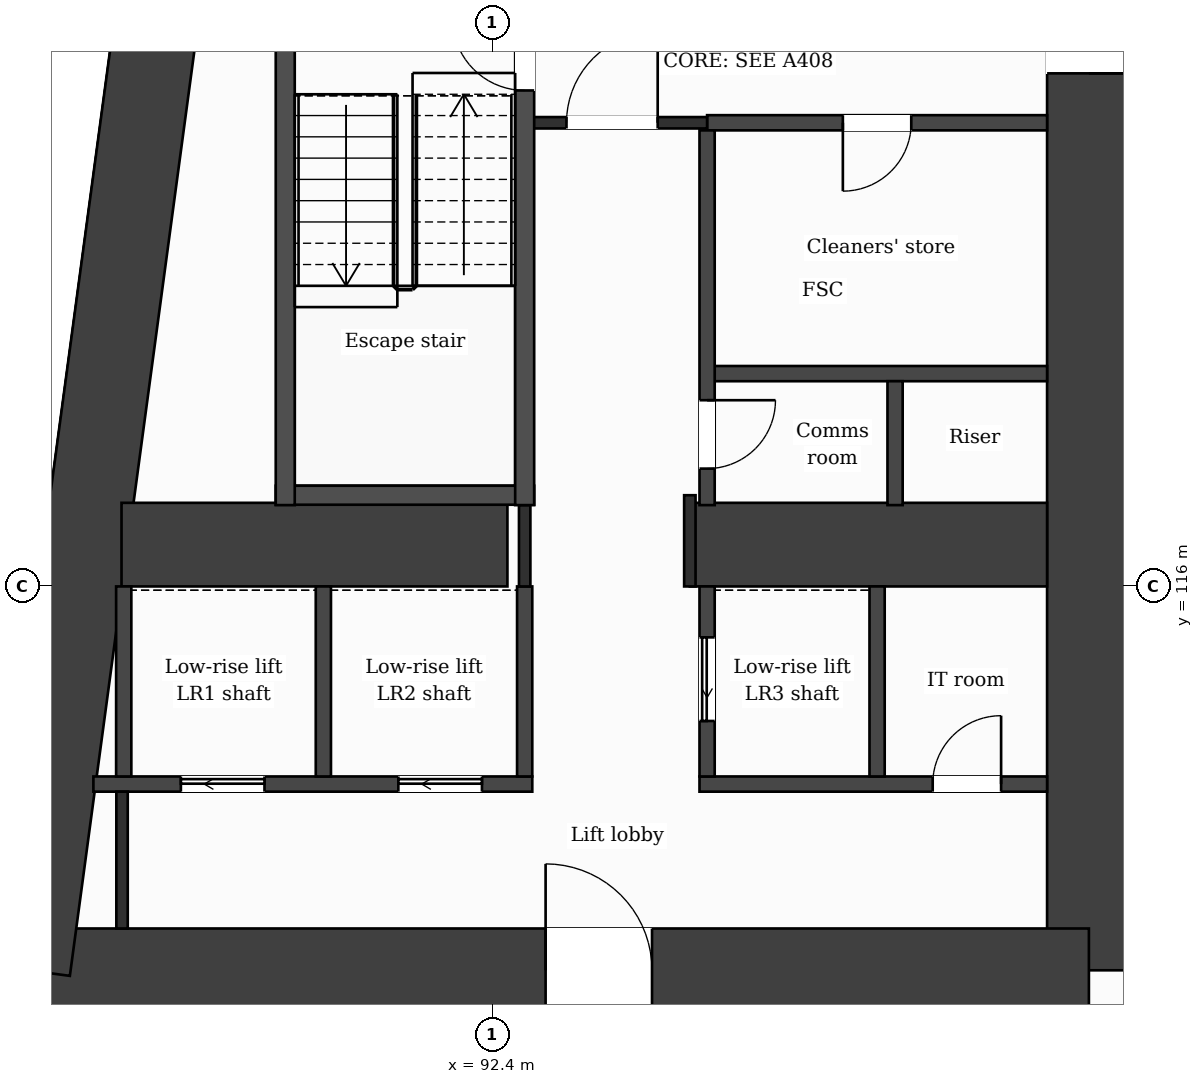
"""IFC4 building model, lengths in metres.
Left out: names, types, materials, properties, quantities, classifications, styles, units other than length and angle.
Written with IfcOpenShell. Run it as: python <this file> out.ifc"""

import sys

from ifc_helpers import new_model, si_unit, direction, frame, frame_2d, origin, place, context, subcontext, project, spatial, rectangle, extrude, element, fill, save


model = new_model("IFC4")
c1 = context("Model", 3, precision=1e-05, world=origin(), true_north=direction((0.0, 1.0)))
c2 = subcontext(c1, "Body", "Model", "MODEL_VIEW")
j1 = project(units=[si_unit("LENGTHUNIT", "METRE"), si_unit("PLANEANGLEUNIT", "RADIAN")], contexts=[c1])
p1 = place(None, origin())
s1 = spatial("IfcSite", under=j1, at=p1, CompositionType="ELEMENT")
p2 = place(p1, origin())
s2 = spatial("IfcBuilding", under=s1, at=p2, CompositionType="ELEMENT")
p3 = place(p2, frame((0.0, 0.0, 42.5)))
s3 = spatial("IfcBuildingStorey", under=s2, at=p3, CompositionType="ELEMENT", Elevation=42.5)
p4 = place(p3, frame((100.25, 131.85, 0.0), z_axis=(0.0, 0.0, 1.0), x_axis=(0.0, -1.0, 0.0)))
e1 = element("IfcWall", 1, at=p4, inside=s3, PredefinedType="SHEAR", context=c2, shape_type="SweptSolid", body=[
    extrude(rectangle(XDim=20.9, YDim=1.1, at=frame_2d((10.45, 0.0))), origin(), (0.0, 0.0, 1.0), 3.5),
])
p5 = place(p4, frame((7.7, 0.0, 0.0)))
e2 = element("IfcOpeningElement", 2, at=p5, cuts=e1, PredefinedType="OPENING", context=c2, shape_type="SweptSolid", body=[
    extrude(rectangle(XDim=1.4, YDim=2.1, at=frame_2d((0.7, 1.05))), frame((0.0, 0.56, 0.0), z_axis=(0.0, -1.0, 0.0), x_axis=(1.0, 0.0, 0.0)), (0.0, 0.0, 1.0), 1.12),
])
p6 = place(p3, frame((100.25, 110.95, 0.0), z_axis=(0.0, 0.0, 1.0), x_axis=(-1.0, 0.0, 0.0)))
e3 = element("IfcWall", 3, at=p6, inside=s3, PredefinedType="SHEAR", context=c2, shape_type="SweptSolid", body=[
    extrude(rectangle(XDim=13.952, YDim=1.1, at=frame_2d((6.976, 0.0))), origin(), (0.0, 0.0, 1.0), 3.5),
])
p7 = place(p6, frame((5.748, 0.0, 0.0)))
e4 = element("IfcOpeningElement", 4, at=p7, cuts=e3, PredefinedType="OPENING", context=c2, shape_type="SweptSolid", body=[
    extrude(rectangle(XDim=1.4, YDim=2.1, at=frame_2d((0.7, 1.05))), frame((0.0, 0.56, 0.0), z_axis=(0.0, -1.0, 0.0), x_axis=(1.0, 0.0, 0.0)), (0.0, 0.0, 1.0), 1.12),
])
p8 = place(p3, frame((86.298, 110.95, 0.0), z_axis=(0.0, 0.0, 1.0), x_axis=(0.133400422634, 0.99106222168, 0.0)))
e5 = element("IfcWall", 5, at=p8, inside=s3, PredefinedType="SHEAR", context=c2, shape_type="SweptSolid", body=[
    extrude(rectangle(XDim=21.089, YDim=1.1, at=frame_2d((10.544, 0.0))), origin(), (0.0, 0.0, 1.0), 3.5),
])
p9 = place(p3, frame((87.523, 116.55, 0.0), z_axis=(0.0, 0.0, 1.0), x_axis=(1.0, 0.0, 0.0)))
e6 = element("IfcWall", 6, at=p9, inside=s3, PredefinedType="SHEAR", context=c2, shape_type="SweptSolid", body=[
    extrude(rectangle(XDim=5.077, YDim=1.1, at=frame_2d((2.539, 0.0))), origin(), (0.0, 0.0, 1.0), 3.5),
])
p10 = place(p3, frame((95.0, 116.55, 0.0), z_axis=(0.0, 0.0, 1.0), x_axis=(1.0, 0.0, 0.0)))
e7 = element("IfcWall", 7, at=p10, inside=s3, PredefinedType="SHEAR", context=c2, shape_type="SweptSolid", body=[
    extrude(rectangle(XDim=4.7, YDim=1.1, at=frame_2d((2.35, 0.0))), origin(), (0.0, 0.0, 1.0), 3.5),
])
p11 = place(p3, frame((87.153, 113.4, 0.0), z_axis=(0.0, 0.0, 1.0), x_axis=(1.0, 0.0, 0.0)))
e8 = element("IfcWall", 8, at=p11, inside=s3, PredefinedType="PARTITIONING", context=c2, shape_type="SweptSolid", body=[
    extrude(rectangle(XDim=5.774, YDim=0.2, at=frame_2d((2.887, 0.0))), origin(), (0.0, 0.0, 1.0), 3.18),
])
p12 = place(p11, frame((1.151, 0.0, 0.0)))
e9 = element("IfcOpeningElement", 9, at=p12, cuts=e8, PredefinedType="OPENING", context=c2, shape_type="SweptSolid", body=[
    extrude(rectangle(XDim=1.1, YDim=2.1, at=frame_2d((0.55, 1.05))), frame((0.0, 0.11, 0.0), z_axis=(0.0, -1.0, 0.0), x_axis=(1.0, 0.0, 0.0)), (0.0, 0.0, 1.0), 0.22),
])
p13 = place(p11, frame((4.012, 0.0, 0.0)))
e10 = element("IfcOpeningElement", 10, at=p13, cuts=e8, PredefinedType="OPENING", context=c2, shape_type="SweptSolid", body=[
    extrude(rectangle(XDim=1.1, YDim=2.1, at=frame_2d((0.55, 1.05))), frame((0.0, 0.11, 0.0), z_axis=(0.0, -1.0, 0.0), x_axis=(1.0, 0.0, 0.0)), (0.0, 0.0, 1.0), 0.22),
])
p14 = place(p3, frame((95.127, 113.4, 0.0), z_axis=(0.0, 0.0, 1.0), x_axis=(1.0, 0.0, 0.0)))
e11 = element("IfcWall", 11, at=p14, inside=s3, PredefinedType="PARTITIONING", context=c2, shape_type="SweptSolid", body=[
    extrude(rectangle(XDim=4.573, YDim=0.2, at=frame_2d((2.287, 0.0))), origin(), (0.0, 0.0, 1.0), 3.18),
])
p15 = place(p14, frame((3.068, 0.0, 0.0)))
e12 = element("IfcOpeningElement", 12, at=p15, cuts=e11, PredefinedType="OPENING", context=c2, shape_type="SweptSolid", body=[
    extrude(rectangle(XDim=0.9, YDim=2.1, at=frame_2d((0.45, 1.05))), frame((0.0, 0.11, 0.0), z_axis=(0.0, -1.0, 0.0), x_axis=(1.0, 0.0, 0.0)), (0.0, 0.0, 1.0), 0.22),
])
p16 = place(p3, frame((89.552, 117.2, 0.0), z_axis=(0.0, 0.0, 1.0), x_axis=(1.0, 0.0, 0.0)))
e13 = element("IfcWall", 13, at=p16, inside=s3, PredefinedType="PARTITIONING", context=c2, shape_type="SweptSolid", body=[
    extrude(rectangle(XDim=3.4, YDim=0.25, at=frame_2d((1.7, 0.0))), origin(), (0.0, 0.0, 1.0), 3.18),
])
p17 = place(p3, frame((95.227, 118.8, 0.0), z_axis=(0.0, 0.0, 1.0), x_axis=(1.0, 0.0, 0.0)))
e14 = element("IfcWall", 14, at=p17, inside=s3, PredefinedType="PARTITIONING", context=c2, shape_type="SweptSolid", body=[
    extrude(rectangle(XDim=4.473, YDim=0.2, at=frame_2d((2.236, 0.0))), origin(), (0.0, 0.0, 1.0), 3.18),
])
p18 = place(p3, frame((95.227, 122.1, 0.0), z_axis=(0.0, 0.0, 1.0), x_axis=(1.0, 0.0, 0.0)))
e15 = element("IfcWall", 15, at=p18, inside=s3, PredefinedType="PARTITIONING", context=c2, shape_type="SweptSolid", body=[
    extrude(rectangle(XDim=4.473, YDim=0.2, at=frame_2d((2.236, 0.0))), origin(), (0.0, 0.0, 1.0), 3.18),
])
p19 = place(p18, frame((1.786, 0.0, 0.0)))
e16 = element("IfcOpeningElement", 16, at=p19, cuts=e15, PredefinedType="OPENING", context=c2, shape_type="SweptSolid", body=[
    extrude(rectangle(XDim=0.9, YDim=2.1, at=frame_2d((0.45, 1.05))), frame((0.0, 0.11, 0.0), z_axis=(0.0, -1.0, 0.0), x_axis=(1.0, 0.0, 0.0)), (0.0, 0.0, 1.0), 0.22),
])
p20 = place(p3, frame((92.827, 122.1, 0.0), z_axis=(0.0, 0.0, 1.0), x_axis=(1.0, 0.0, 0.0)))
e17 = element("IfcWall", 17, at=p20, inside=s3, PredefinedType="PARTITIONING", context=c2, shape_type="SweptSolid", body=[
    extrude(rectangle(XDim=2.4, YDim=0.15, at=frame_2d((1.2, 0.0))), origin(), (0.0, 0.0, 1.0), 3.18),
])
p21 = place(p20, frame((0.55, 0.0, 0.0)))
e18 = element("IfcOpeningElement", 18, at=p21, cuts=e17, PredefinedType="OPENING", context=c2, shape_type="SweptSolid", body=[
    extrude(rectangle(XDim=1.2, YDim=2.1, at=frame_2d((0.6, 1.05))), frame((0.0, 0.085, 0.0), z_axis=(0.0, -1.0, 0.0), x_axis=(1.0, 0.0, 0.0)), (0.0, 0.0, 1.0), 0.17),
])
p22 = place(p3, frame((87.552, 113.5, 0.0), z_axis=(0.0, 0.0, 1.0), x_axis=(0.0, 1.0, 0.0)))
e19 = element("IfcWall", 19, at=p22, inside=s3, PredefinedType="PARTITIONING", context=c2, shape_type="SweptSolid", body=[
    extrude(rectangle(XDim=2.5, YDim=0.2, at=frame_2d((1.25, 0.0))), origin(), (0.0, 0.0, 1.0), 3.18),
])
p23 = place(p3, frame((87.53, 111.5, 0.0), z_axis=(0.0, 0.0, 1.0), x_axis=(0.0, 1.0, 0.0)))
e20 = element("IfcWall", 20, at=p23, inside=s3, PredefinedType="PARTITIONING", context=c2, shape_type="SweptSolid", body=[
    extrude(rectangle(XDim=1.8, YDim=0.15, at=frame_2d((0.9, 0.0))), origin(), (0.0, 0.0, 1.0), 3.18),
])
p24 = place(p3, frame((89.677, 117.07, 0.0), z_axis=(0.0, 0.0, 1.0), x_axis=(0.0, 1.0, 0.0)))
e21 = element("IfcWall", 21, at=p24, inside=s3, PredefinedType="PARTITIONING", context=c2, shape_type="SweptSolid", body=[
    extrude(rectangle(XDim=6.755, YDim=0.25, at=frame_2d((3.377, 0.0))), origin(), (0.0, 0.0, 1.0), 3.18),
])
for number, where, z_axis, x_axis in (
    (22, (90.178, 113.5, 0.0), (0.0, 0.0, 1.0), (0.0, 1.0, 0.0)),
    (23, (92.827, 113.5, 0.0), (0.0, 0.0, 1.0), (0.0, 1.0, 0.0)),
):
    element("IfcWall", number, at=place(p3, frame(where, z_axis=z_axis, x_axis=x_axis)), inside=s3, PredefinedType="PARTITIONING", context=c2, shape_type="SweptSolid", body=[
        extrude(rectangle(XDim=2.5, YDim=0.2, at=frame_2d((1.25, 0.0))), origin(), (0.0, 0.0, 1.0), 3.18),
    ])
p25 = place(p3, frame((92.827, 116.0, 0.0), z_axis=(0.0, 0.0, 1.0), x_axis=(0.0, 1.0, 0.0)))
e24 = element("IfcWall", 24, at=p25, inside=s3, PredefinedType="PARTITIONING", context=c2, shape_type="SweptSolid", body=[
    extrude(rectangle(XDim=1.07, YDim=0.15, at=frame_2d((0.535, 0.0))), origin(), (0.0, 0.0, 1.0), 3.18),
])
p26 = place(p3, frame((92.827, 117.07, 0.0), z_axis=(0.0, 0.0, 1.0), x_axis=(0.0, 1.0, 0.0)))
e25 = element("IfcWall", 25, at=p26, inside=s3, PredefinedType="PARTITIONING", context=c2, shape_type="SweptSolid", body=[
    extrude(rectangle(XDim=6.755, YDim=0.25, at=frame_2d((3.377, 0.0))), origin(), (0.0, 0.0, 1.0), 3.18),
])
p27 = place(p26, frame((5.455, 0.0, 0.0)))
e26 = element("IfcOpeningElement", 26, at=p27, cuts=e25, PredefinedType="OPENING", context=c2, shape_type="SweptSolid", body=[
    extrude(rectangle(XDim=0.95, YDim=2.1, at=frame_2d((0.475, 1.05))), frame((0.0, 0.135, 0.0), z_axis=(0.0, -1.0, 0.0), x_axis=(1.0, 0.0, 0.0)), (0.0, 0.0, 1.0), 0.27),
])
p28 = place(p3, frame((95.0, 116.0, 0.0), z_axis=(0.0, 0.0, 1.0), x_axis=(0.0, 1.0, 0.0)))
e27 = element("IfcWall", 27, at=p28, inside=s3, PredefinedType="PARTITIONING", context=c2, shape_type="SweptSolid", body=[
    extrude(rectangle(XDim=1.2, YDim=0.15, at=frame_2d((0.6, 0.0))), origin(), (0.0, 0.0, 1.0), 3.18),
])
p29 = place(p3, frame((95.227, 113.5, 0.0), z_axis=(0.0, 0.0, 1.0), x_axis=(0.0, 1.0, 0.0)))
e28 = element("IfcWall", 28, at=p29, inside=s3, PredefinedType="PARTITIONING", context=c2, shape_type="SweptSolid", body=[
    extrude(rectangle(XDim=2.5, YDim=0.2, at=frame_2d((1.25, 0.0))), origin(), (0.0, 0.0, 1.0), 3.18),
])
p30 = place(p29, frame((0.73, 0.0, 0.0)))
e29 = element("IfcOpeningElement", 29, at=p30, cuts=e28, PredefinedType="OPENING", context=c2, shape_type="SweptSolid", body=[
    extrude(rectangle(XDim=1.1, YDim=2.1, at=frame_2d((0.55, 1.05))), frame((0.0, 0.11, 0.0), z_axis=(0.0, -1.0, 0.0), x_axis=(1.0, 0.0, 0.0)), (0.0, 0.0, 1.0), 0.22),
])
p31 = place(p3, frame((95.227, 117.07, 0.0), z_axis=(0.0, 0.0, 1.0), x_axis=(0.0, 1.0, 0.0)))
e30 = element("IfcWall", 30, at=p31, inside=s3, PredefinedType="PARTITIONING", context=c2, shape_type="SweptSolid", body=[
    extrude(rectangle(XDim=4.93, YDim=0.2, at=frame_2d((2.465, 0.0))), origin(), (0.0, 0.0, 1.0), 3.18),
])
p32 = place(p31, frame((0.48, 0.0, 0.0)))
e31 = element("IfcOpeningElement", 31, at=p32, cuts=e30, PredefinedType="OPENING", context=c2, shape_type="SweptSolid", body=[
    extrude(rectangle(XDim=0.9, YDim=2.1, at=frame_2d((0.45, 1.05))), frame((0.0, 0.11, 0.0), z_axis=(0.0, -1.0, 0.0), x_axis=(1.0, 0.0, 0.0)), (0.0, 0.0, 1.0), 0.22),
])
p33 = place(p3, frame((97.463, 113.5, 0.0), z_axis=(0.0, 0.0, 1.0), x_axis=(0.0, 1.0, 0.0)))
e32 = element("IfcWall", 32, at=p33, inside=s3, PredefinedType="PARTITIONING", context=c2, shape_type="SweptSolid", body=[
    extrude(rectangle(XDim=2.5, YDim=0.2, at=frame_2d((1.25, 0.0))), origin(), (0.0, 0.0, 1.0), 3.18),
])
p34 = place(p3, frame((97.7, 117.07, 0.0), z_axis=(0.0, 0.0, 1.0), x_axis=(0.0, 1.0, 0.0)))
e33 = element("IfcWall", 33, at=p34, inside=s3, PredefinedType="PARTITIONING", context=c2, shape_type="SweptSolid", body=[
    extrude(rectangle(XDim=1.63, YDim=0.2, at=frame_2d((0.815, 0.0))), origin(), (0.0, 0.0, 1.0), 3.18),
])
p35 = place(p21, origin())
e34 = element("IfcDoor", 34, at=p35, inside=s3, OperationType="SINGLE_SWING_RIGHT", PredefinedType="DOOR", context=c2, shape_type="SweptSolid", body=[
    extrude(rectangle(XDim=1.2, YDim=2.1, at=frame_2d((0.6, 1.05))), frame((0.0, 0.025, 0.0), z_axis=(0.0, -1.0, 0.0), x_axis=(1.0, 0.0, 0.0)), (0.0, 0.0, 1.0), 0.05),
])
fill(e18, e34)
p36 = place(p19, origin())
e35 = element("IfcDoor", 35, at=p36, inside=s3, OperationType="SINGLE_SWING_LEFT", PredefinedType="DOOR", context=c2, shape_type="SweptSolid", body=[
    extrude(rectangle(XDim=0.9, YDim=2.1, at=frame_2d((0.45, 1.05))), frame((0.0, 0.025, 0.0), z_axis=(0.0, -1.0, 0.0), x_axis=(1.0, 0.0, 0.0)), (0.0, 0.0, 1.0), 0.05),
])
fill(e16, e35)
p37 = place(p27, origin())
e36 = element("IfcDoor", 36, at=p37, inside=s3, OperationType="SINGLE_SWING_RIGHT", PredefinedType="DOOR", context=c2, shape_type="SweptSolid", body=[
    extrude(rectangle(XDim=0.95, YDim=2.1, at=frame_2d((0.475, 1.05))), frame((0.0, 0.025, 0.0), z_axis=(0.0, -1.0, 0.0), x_axis=(1.0, 0.0, 0.0)), (0.0, 0.0, 1.0), 0.05),
])
fill(e26, e36)
p38 = place(p32, origin())
e37 = element("IfcDoor", 37, at=p38, inside=s3, OperationType="SINGLE_SWING_RIGHT", PredefinedType="DOOR", context=c2, shape_type="SweptSolid", body=[
    extrude(rectangle(XDim=0.9, YDim=2.1, at=frame_2d((0.45, 1.05))), frame((0.0, 0.025, 0.0), z_axis=(0.0, -1.0, 0.0), x_axis=(1.0, 0.0, 0.0)), (0.0, 0.0, 1.0), 0.05),
])
fill(e31, e37)
p39 = place(p12, origin())
e38 = element("IfcDoor", 38, at=p39, inside=s3, OperationType="SLIDING_TO_LEFT", PredefinedType="DOOR", context=c2, shape_type="SweptSolid", body=[
    extrude(rectangle(XDim=1.1, YDim=2.1, at=frame_2d((0.55, 1.05))), frame((0.0, 0.025, 0.0), z_axis=(0.0, -1.0, 0.0), x_axis=(1.0, 0.0, 0.0)), (0.0, 0.0, 1.0), 0.05),
])
fill(e9, e38)
p40 = place(p13, origin())
e39 = element("IfcDoor", 39, at=p40, inside=s3, OperationType="SLIDING_TO_LEFT", PredefinedType="DOOR", context=c2, shape_type="SweptSolid", body=[
    extrude(rectangle(XDim=1.1, YDim=2.1, at=frame_2d((0.55, 1.05))), frame((0.0, 0.025, 0.0), z_axis=(0.0, -1.0, 0.0), x_axis=(1.0, 0.0, 0.0)), (0.0, 0.0, 1.0), 0.05),
])
fill(e10, e39)
p41 = place(p30, origin())
e40 = element("IfcDoor", 40, at=p41, inside=s3, OperationType="SLIDING_TO_LEFT", PredefinedType="DOOR", context=c2, shape_type="SweptSolid", body=[
    extrude(rectangle(XDim=1.1, YDim=2.1, at=frame_2d((0.55, 1.05))), frame((0.0, 0.025, 0.0), z_axis=(0.0, -1.0, 0.0), x_axis=(1.0, 0.0, 0.0)), (0.0, 0.0, 1.0), 0.05),
])
fill(e29, e40)
p42 = place(p15, origin())
e41 = element("IfcDoor", 41, at=p42, inside=s3, OperationType="SINGLE_SWING_RIGHT", PredefinedType="DOOR", context=c2, shape_type="SweptSolid", body=[
    extrude(rectangle(XDim=0.9, YDim=2.1, at=frame_2d((0.45, 1.05))), frame((0.0, 0.025, 0.0), z_axis=(0.0, -1.0, 0.0), x_axis=(1.0, 0.0, 0.0)), (0.0, 0.0, 1.0), 0.05),
])
fill(e12, e41)
p43 = place(p7, origin())
e42 = element("IfcDoor", 42, at=p43, inside=s3, OperationType="SINGLE_SWING_RIGHT", PredefinedType="DOOR", context=c2, shape_type="SweptSolid", body=[
    extrude(rectangle(XDim=1.4, YDim=2.1, at=frame_2d((0.7, 1.05))), frame((0.0, 0.025, 0.0), z_axis=(0.0, -1.0, 0.0), x_axis=(1.0, 0.0, 0.0)), (0.0, 0.0, 1.0), 0.05),
])
fill(e4, e42)
p44 = place(p5, origin())
e43 = element("IfcDoor", 43, at=p44, inside=s3, OperationType="SINGLE_SWING_RIGHT", PredefinedType="DOOR", context=c2, shape_type="SweptSolid", body=[
    extrude(rectangle(XDim=1.4, YDim=2.1, at=frame_2d((0.7, 1.05))), frame((0.0, 0.025, 0.0), z_axis=(0.0, -1.0, 0.0), x_axis=(1.0, 0.0, 0.0)), (0.0, 0.0, 1.0), 0.05),
])
fill(e2, e43)
save(model, sys.argv[1])
